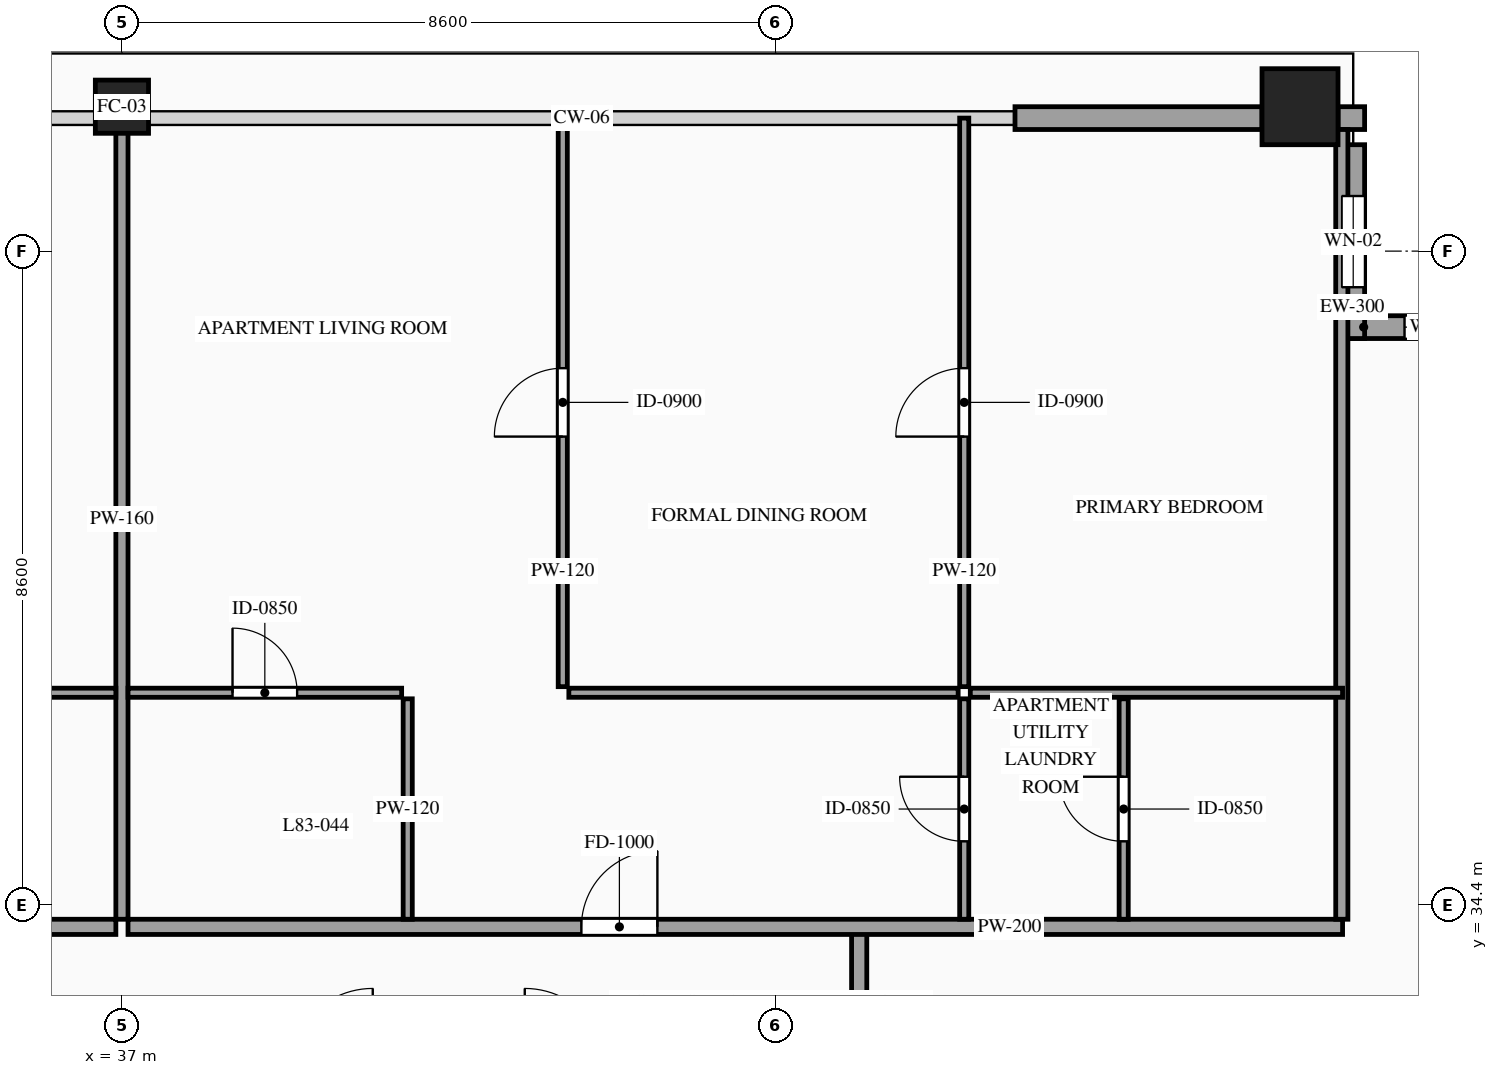
"""IFC4 building model, lengths in metres.
Left out: names, types, materials, properties, quantities, classifications, styles, units other than length and angle.
Written with IfcOpenShell. Run it as: python <this file> out.ifc"""

import sys

from ifc_helpers import new_model, si_unit, direction, frame, frame_2d, origin, origin_2d, place, context, subcontext, project, spatial, rectangle, hollow_rectangle, extrude, source, transform, mapped, element, fill, save


model = new_model("IFC4")
c1 = context("Model", 3, precision=1e-05, world=origin(), true_north=direction((0.0, 1.0)))
c2 = subcontext(c1, "Body", "Model", "MODEL_VIEW")
j1 = project(units=[si_unit("LENGTHUNIT", "METRE"), si_unit("PLANEANGLEUNIT", "RADIAN")], contexts=[c1])
p1 = place(None, origin())
s1 = spatial("IfcSite", under=j1, at=p1, CompositionType="ELEMENT")
p2 = place(p1, origin())
s2 = spatial("IfcBuilding", under=s1, at=p2, CompositionType="ELEMENT")
p3 = place(p2, frame((0.0, 0.0, 311.2)))
s3 = spatial("IfcBuildingStorey", under=s2, at=p3, CompositionType="ELEMENT", Elevation=311.2)
m1 = source(origin(), c2, "Body", "SweptSolid", [
    extrude(hollow_rectangle(XDim=0.7, YDim=0.7, WallThickness=0.032, at=origin_2d()), origin(), (0.0, 0.0, 1.0), 3.5),
])
p4 = place(p3, frame((37.0, 44.9, 0.0), z_axis=(0.0, 0.0, 1.0), x_axis=(1.0, 0.0, 0.0)))
e1 = element("IfcColumn", 1, at=p4, inside=s3, PredefinedType="COLUMN", context=c2, shape_type="MappedRepresentation", body=[
    mapped(m1, transform((0.0, 0.0, 0.0), scale=1.0)),
])
m2 = source(origin(), c2, "Body", "SweptSolid", [
    extrude(hollow_rectangle(XDim=1.0, YDim=1.0, WallThickness=0.048, at=origin_2d()), origin(), (0.0, 0.0, 1.0), 3.5),
])
p5 = place(p3, frame((52.5, 44.9, 0.0), z_axis=(0.0, 0.0, 1.0), x_axis=(1.0, 0.0, 0.0)))
e2 = element("IfcColumn", 2, at=p5, inside=s3, PredefinedType="COLUMN", context=c2, shape_type="MappedRepresentation", body=[
    mapped(m2, transform((0.0, 0.0, 0.0), scale=1.0)),
])
p6 = place(p3, frame((55.6, 42.0, 0.0), z_axis=(0.0, 0.0, 1.0), x_axis=(-1.0, 0.0, 0.0)))
e3 = element("IfcWall", 3, at=p6, inside=s3, PredefinedType="SOLIDWALL", context=c2, shape_type="SweptSolid", body=[
    extrude(rectangle(XDim=2.55, YDim=0.3, at=frame_2d((1.275, 0.0))), origin(), (0.0, 0.0, 1.0), 3.28),
])
p7 = place(p6, frame((0.825, 0.0, 0.85)))
e4 = element("IfcOpeningElement", 4, at=p7, cuts=e3, PredefinedType="OPENING", context=c2, shape_type="SweptSolid", body=[
    extrude(rectangle(XDim=0.9, YDim=1.5, at=frame_2d((0.45, 0.75))), frame((0.0, 0.165, 0.0), z_axis=(0.0, -1.0, 0.0), x_axis=(1.0, 0.0, 0.0)), (0.0, 0.0, 1.0), 0.33),
])
p8 = place(p3, frame((53.2, 41.85, 0.0), z_axis=(0.0, 0.0, 1.0), x_axis=(0.0, 1.0, 0.0)))
e5 = element("IfcWall", 5, at=p8, inside=s3, PredefinedType="SOLIDWALL", context=c2, shape_type="SweptSolid", body=[
    extrude(rectangle(XDim=2.55, YDim=0.3, at=frame_2d((1.275, 0.0))), origin(), (0.0, 0.0, 1.0), 3.28),
])
p9 = place(p8, frame((0.675, 0.0, 0.85)))
e6 = element("IfcOpeningElement", 6, at=p9, cuts=e5, PredefinedType="OPENING", context=c2, shape_type="SweptSolid", body=[
    extrude(rectangle(XDim=1.2, YDim=2.1, at=frame_2d((0.6, 1.05))), frame((0.0, 0.165, 0.0), z_axis=(0.0, -1.0, 0.0), x_axis=(1.0, 0.0, 0.0)), (0.0, 0.0, 1.0), 0.33),
])
m3 = source(origin(), c2, "Body", "SweptSolid", [
    extrude(rectangle(XDim=0.35, YDim=0.3, at=frame_2d((0.175, 0.0))), origin(), (0.0, 0.0, 1.0), 3.28),
])
p10 = place(p3, frame((53.0, 44.75, 0.0), z_axis=(0.0, 0.0, 1.0), x_axis=(1.0, 0.0, 0.0)))
e7 = element("IfcWall", 7, at=p10, inside=s3, PredefinedType="SOLIDWALL", context=c2, shape_type="MappedRepresentation", body=[
    mapped(m3, transform((0.0, 0.0, 0.0), scale=1.0)),
])
m4 = source(origin(), c2, "Body", "SweptSolid", [
    extrude(rectangle(XDim=3.25, YDim=0.3, at=frame_2d((1.625, 0.0))), origin(), (0.0, 0.0, 1.0), 2.885),
])
p11 = place(p3, frame((48.75, 44.75, 0.0), z_axis=(0.0, 0.0, 1.0), x_axis=(1.0, 0.0, 0.0)))
e8 = element("IfcWall", 8, at=p11, inside=s3, PredefinedType="SOLIDWALL", context=c2, shape_type="MappedRepresentation", body=[
    mapped(m4, transform((0.0, 0.0, 0.0), scale=1.0)),
])
m5 = source(origin(), c2, "Body", "SweptSolid", [
    extrude(rectangle(XDim=1.7, YDim=0.2, at=frame_2d((0.85, 0.0))), origin(), (0.0, 0.0, 1.0), 3.28),
])
p12 = place(p3, frame((46.7, 32.35, 0.0), z_axis=(0.0, 0.0, 1.0), x_axis=(0.0, 1.0, 0.0)))
e9 = element("IfcWall", 9, at=p12, inside=s3, PredefinedType="PARTITIONING", context=c2, shape_type="MappedRepresentation", body=[
    mapped(m5, transform((0.0, 0.0, 0.0), scale=1.0)),
])
p13 = place(p3, frame((20.94, 34.11, 0.0), z_axis=(0.0, 0.0, 1.0), x_axis=(1.0, 0.0, 0.0)))
e10 = element("IfcWall", 10, at=p13, inside=s3, PredefinedType="PARTITIONING", context=c2, shape_type="SweptSolid", body=[
    extrude(rectangle(XDim=15.98, YDim=0.2, at=frame_2d((7.99, 0.0))), origin(), (0.0, 0.0, 1.0), 3.28),
])
p14 = place(p13, frame((6.841, 0.0, 0.0)))
e11 = element("IfcOpeningElement", 11, at=p14, cuts=e10, PredefinedType="OPENING", context=c2, shape_type="SweptSolid", body=[
    extrude(rectangle(XDim=1.0, YDim=2.2, at=frame_2d((0.5, 1.1))), frame((0.0, 0.115, 0.0), z_axis=(0.0, -1.0, 0.0), x_axis=(1.0, 0.0, 0.0)), (0.0, 0.0, 1.0), 0.23),
])
m6 = source(origin(), c2, "Body", "SweptSolid", [
    extrude(rectangle(XDim=10.54, YDim=0.16, at=frame_2d((5.27, 0.0))), origin(), (0.0, 0.0, 1.0), 2.787),
])
p15 = place(p3, frame((37.0, 34.21, 0.0), z_axis=(0.0, 0.0, 1.0), x_axis=(0.0, 1.0, 0.0)))
e12 = element("IfcWall", 12, at=p15, inside=s3, PredefinedType="PARTITIONING", context=c2, shape_type="MappedRepresentation", body=[
    mapped(m6, transform((0.0, 0.0, 0.0), scale=1.0)),
])
m7 = source(origin(), c2, "Body", "SweptSolid", [
    extrude(rectangle(XDim=4.898, YDim=0.12, at=frame_2d((2.449, 0.0))), origin(), (0.0, 0.0, 1.0), 3.28),
])
p16 = place(p3, frame((32.022, 37.19, 0.0), z_axis=(0.0, 0.0, 1.0), x_axis=(1.0, 0.0, 0.0)))
e13 = element("IfcWall", 13, at=p16, inside=s3, PredefinedType="PARTITIONING", context=c2, shape_type="MappedRepresentation", body=[
    mapped(m7, transform((0.0, 0.0, 0.0), scale=1.0)),
])
p17 = place(p3, frame((37.08, 34.11, 0.0), z_axis=(0.0, 0.0, 1.0), x_axis=(1.0, 0.0, 0.0)))
e14 = element("IfcWall", 14, at=p17, inside=s3, PredefinedType="PARTITIONING", context=c2, shape_type="SweptSolid", body=[
    extrude(rectangle(XDim=15.98, YDim=0.2, at=frame_2d((7.99, 0.0))), origin(), (0.0, 0.0, 1.0), 3.28),
])
p18 = place(p17, frame((5.965, 0.0, 0.0)))
e15 = element("IfcOpeningElement", 15, at=p18, cuts=e14, PredefinedType="OPENING", context=c2, shape_type="SweptSolid", body=[
    extrude(rectangle(XDim=1.0, YDim=2.2, at=frame_2d((0.5, 1.1))), frame((0.0, 0.115, 0.0), z_axis=(0.0, -1.0, 0.0), x_axis=(1.0, 0.0, 0.0)), (0.0, 0.0, 1.0), 0.23),
])
m8 = source(origin(), c2, "Body", "SweptSolid", [
    extrude(rectangle(XDim=10.39, YDim=0.16, at=frame_2d((5.195, 0.0))), origin(), (0.0, 0.0, 1.0), 3.28),
])
p19 = place(p3, frame((53.05, 34.21, 0.0), z_axis=(0.0, 0.0, 1.0), x_axis=(0.0, 1.0, 0.0)))
e16 = element("IfcWall", 16, at=p19, inside=s3, PredefinedType="PARTITIONING", context=c2, shape_type="MappedRepresentation", body=[
    mapped(m8, transform((0.0, 0.0, 0.0), scale=1.0)),
])
p20 = place(p3, frame((37.08, 37.19, 0.0), z_axis=(0.0, 0.0, 1.0), x_axis=(1.0, 0.0, 0.0)))
e17 = element("IfcWall", 17, at=p20, inside=s3, PredefinedType="PARTITIONING", context=c2, shape_type="SweptSolid", body=[
    extrude(rectangle(XDim=3.6, YDim=0.12, at=frame_2d((1.8, 0.0))), origin(), (0.0, 0.0, 1.0), 3.28),
])
p21 = place(p20, frame((1.375, 0.0, 0.0)))
e18 = element("IfcOpeningElement", 18, at=p21, cuts=e17, PredefinedType="OPENING", context=c2, shape_type="SweptSolid", body=[
    extrude(rectangle(XDim=0.85, YDim=2.1, at=frame_2d((0.425, 1.05))), frame((0.0, 0.075, 0.0), z_axis=(0.0, -1.0, 0.0), x_axis=(1.0, 0.0, 0.0)), (0.0, 0.0, 1.0), 0.15),
])
m9 = source(origin(), c2, "Body", "SweptSolid", [
    extrude(rectangle(XDim=2.9, YDim=0.12, at=frame_2d((1.45, 0.0))), origin(), (0.0, 0.0, 1.0), 3.28),
])
p22 = place(p3, frame((40.76, 34.21, 0.0), z_axis=(0.0, 0.0, 1.0), x_axis=(0.0, 1.0, 0.0)))
e19 = element("IfcWall", 19, at=p22, inside=s3, PredefinedType="PARTITIONING", context=c2, shape_type="MappedRepresentation", body=[
    mapped(m9, transform((0.0, 0.0, 0.0), scale=1.0)),
])
p23 = place(p3, frame((50.18, 34.21, 0.0), z_axis=(0.0, 0.0, 1.0), x_axis=(0.0, 1.0, 0.0)))
e20 = element("IfcWall", 20, at=p23, inside=s3, PredefinedType="PARTITIONING", context=c2, shape_type="SweptSolid", body=[
    extrude(rectangle(XDim=2.9, YDim=0.12, at=frame_2d((1.45, 0.0))), origin(), (0.0, 0.0, 1.0), 2.825),
])
p24 = place(p23, frame((1.025, 0.0, 0.0)))
e21 = element("IfcOpeningElement", 21, at=p24, cuts=e20, PredefinedType="OPENING", context=c2, shape_type="SweptSolid", body=[
    extrude(rectangle(XDim=0.85, YDim=2.1, at=frame_2d((0.425, 1.05))), frame((0.0, 0.075, 0.0), z_axis=(0.0, -1.0, 0.0), x_axis=(1.0, 0.0, 0.0)), (0.0, 0.0, 1.0), 0.15),
])
p25 = place(p3, frame((48.162, 37.19, 0.0), z_axis=(0.0, 0.0, 1.0), x_axis=(1.0, 0.0, 0.0)))
e22 = element("IfcWall", 22, at=p25, inside=s3, PredefinedType="PARTITIONING", context=c2, shape_type="MappedRepresentation", body=[
    mapped(m7, transform((0.0, 0.0, 0.0), scale=1.0)),
])
p26 = place(p3, frame((48.082, 37.27, 0.0), z_axis=(0.0, 0.0, 1.0), x_axis=(0.0, 1.0, 0.0)))
e23 = element("IfcWall", 23, at=p26, inside=s3, PredefinedType="PARTITIONING", context=c2, shape_type="SweptSolid", body=[
    extrude(rectangle(XDim=7.48, YDim=0.12, at=frame_2d((3.74, 0.0))), origin(), (0.0, 0.0, 1.0), 3.28),
])
p27 = place(p26, frame((3.29, 0.0, 0.0)))
e24 = element("IfcOpeningElement", 24, at=p27, cuts=e23, PredefinedType="OPENING", context=c2, shape_type="SweptSolid", body=[
    extrude(rectangle(XDim=0.9, YDim=2.15, at=frame_2d((0.45, 1.075))), frame((0.0, 0.075, 0.0), z_axis=(0.0, -1.0, 0.0), x_axis=(1.0, 0.0, 0.0)), (0.0, 0.0, 1.0), 0.15),
])
p28 = place(p3, frame((48.082, 34.21, 0.0), z_axis=(0.0, 0.0, 1.0), x_axis=(0.0, 1.0, 0.0)))
e25 = element("IfcWall", 25, at=p28, inside=s3, PredefinedType="PARTITIONING", context=c2, shape_type="SweptSolid", body=[
    extrude(rectangle(XDim=2.9, YDim=0.12, at=frame_2d((1.45, 0.0))), origin(), (0.0, 0.0, 1.0), 3.28),
])
p29 = place(p28, frame((1.025, 0.0, 0.0)))
e26 = element("IfcOpeningElement", 26, at=p29, cuts=e25, PredefinedType="OPENING", context=c2, shape_type="SweptSolid", body=[
    extrude(rectangle(XDim=0.85, YDim=2.1, at=frame_2d((0.425, 1.05))), frame((0.0, 0.075, 0.0), z_axis=(0.0, -1.0, 0.0), x_axis=(1.0, 0.0, 0.0)), (0.0, 0.0, 1.0), 0.15),
])
m10 = source(origin(), c2, "Body", "SweptSolid", [
    extrude(rectangle(XDim=5.122, YDim=0.12, at=frame_2d((2.561, 0.0))), origin(), (0.0, 0.0, 1.0), 3.28),
])
p30 = place(p3, frame((42.88, 37.19, 0.0), z_axis=(0.0, 0.0, 1.0), x_axis=(1.0, 0.0, 0.0)))
e27 = element("IfcWall", 27, at=p30, inside=s3, PredefinedType="PARTITIONING", context=c2, shape_type="MappedRepresentation", body=[
    mapped(m10, transform((0.0, 0.0, 0.0), scale=1.0)),
])
p31 = place(p3, frame((42.8, 37.27, 0.0), z_axis=(0.0, 0.0, 1.0), x_axis=(0.0, 1.0, 0.0)))
e28 = element("IfcWall", 28, at=p31, inside=s3, PredefinedType="PARTITIONING", context=c2, shape_type="SweptSolid", body=[
    extrude(rectangle(XDim=7.48, YDim=0.12, at=frame_2d((3.74, 0.0))), origin(), (0.0, 0.0, 1.0), 3.28),
])
p32 = place(p31, frame((3.29, 0.0, 0.0)))
e29 = element("IfcOpeningElement", 29, at=p32, cuts=e28, PredefinedType="OPENING", context=c2, shape_type="SweptSolid", body=[
    extrude(rectangle(XDim=0.9, YDim=2.15, at=frame_2d((0.45, 1.075))), frame((0.0, 0.075, 0.0), z_axis=(0.0, -1.0, 0.0), x_axis=(1.0, 0.0, 0.0)), (0.0, 0.0, 1.0), 0.15),
])
m11 = source(origin(), c2, "Body", "SweptSolid", [
    extrude(rectangle(XDim=0.9, YDim=1.5, at=frame_2d((0.45, 0.75))), frame((0.0, 0.03, 0.0), z_axis=(0.0, -1.0, 0.0), x_axis=(1.0, 0.0, 0.0)), (0.0, 0.0, 1.0), 0.06),
])
p33 = place(p7, origin())
e30 = element("IfcWindow", 30, at=p33, inside=s3, PartitioningType="SINGLE_PANEL", PredefinedType="WINDOW", context=c2, shape_type="MappedRepresentation", body=[
    mapped(m11, transform((0.0, 0.0, 0.0), scale=1.0)),
])
fill(e4, e30)
m12 = source(origin(), c2, "Body", "SweptSolid", [
    extrude(rectangle(XDim=1.2, YDim=2.1, at=frame_2d((0.6, 1.05))), frame((0.0, 0.03, 0.0), z_axis=(0.0, -1.0, 0.0), x_axis=(1.0, 0.0, 0.0)), (0.0, 0.0, 1.0), 0.06),
])
p34 = place(p9, origin())
e31 = element("IfcWindow", 31, at=p34, inside=s3, PartitioningType="SINGLE_PANEL", PredefinedType="WINDOW", context=c2, shape_type="MappedRepresentation", body=[
    mapped(m12, transform((0.0, 0.0, 0.0), scale=1.0)),
])
fill(e6, e31)
m13 = source(origin(), c2, "Body", "SweptSolid", [
    extrude(rectangle(XDim=1.0, YDim=2.2, at=frame_2d((0.5, 1.1))), frame((0.0, 0.025, 0.0), z_axis=(0.0, -1.0, 0.0), x_axis=(1.0, 0.0, 0.0)), (0.0, 0.0, 1.0), 0.05),
])
p35 = place(p18, origin())
e32 = element("IfcDoor", 32, at=p35, inside=s3, OperationType="SINGLE_SWING_RIGHT", PredefinedType="DOOR", context=c2, shape_type="MappedRepresentation", body=[
    mapped(m13, transform((0.0, 0.0, 0.0), scale=1.0)),
])
fill(e15, e32)
m14 = source(origin(), c2, "Body", "SweptSolid", [
    extrude(rectangle(XDim=0.85, YDim=2.1, at=frame_2d((0.425, 1.05))), frame((0.0, 0.025, 0.0), z_axis=(0.0, -1.0, 0.0), x_axis=(1.0, 0.0, 0.0)), (0.0, 0.0, 1.0), 0.05),
])
p36 = place(p21, origin())
e33 = element("IfcDoor", 33, at=p36, inside=s3, OperationType="SINGLE_SWING_LEFT", PredefinedType="DOOR", context=c2, shape_type="MappedRepresentation", body=[
    mapped(m14, transform((0.0, 0.0, 0.0), scale=1.0)),
])
fill(e18, e33)
p37 = place(p24, origin())
e34 = element("IfcDoor", 34, at=p37, inside=s3, OperationType="SINGLE_SWING_RIGHT", PredefinedType="DOOR", context=c2, shape_type="MappedRepresentation", body=[
    mapped(m14, transform((0.0, 0.0, 0.0), scale=1.0)),
])
fill(e21, e34)
m15 = source(origin(), c2, "Body", "SweptSolid", [
    extrude(rectangle(XDim=0.9, YDim=2.15, at=frame_2d((0.45, 1.075))), frame((0.0, 0.025, 0.0), z_axis=(0.0, -1.0, 0.0), x_axis=(1.0, 0.0, 0.0)), (0.0, 0.0, 1.0), 0.05),
])
p38 = place(p27, origin())
e35 = element("IfcDoor", 35, at=p38, inside=s3, OperationType="SINGLE_SWING_LEFT", PredefinedType="DOOR", context=c2, shape_type="MappedRepresentation", body=[
    mapped(m15, transform((0.0, 0.0, 0.0), scale=1.0)),
])
fill(e24, e35)
p39 = place(p29, origin())
e36 = element("IfcDoor", 36, at=p39, inside=s3, OperationType="SINGLE_SWING_RIGHT", PredefinedType="DOOR", context=c2, shape_type="MappedRepresentation", body=[
    mapped(m14, transform((0.0, 0.0, 0.0), scale=1.0)),
])
fill(e26, e36)
p40 = place(p32, origin())
e37 = element("IfcDoor", 37, at=p40, inside=s3, OperationType="SINGLE_SWING_LEFT", PredefinedType="DOOR", context=c2, shape_type="MappedRepresentation", body=[
    mapped(m15, transform((0.0, 0.0, 0.0), scale=1.0)),
])
fill(e29, e37)
save(model, sys.argv[1])
